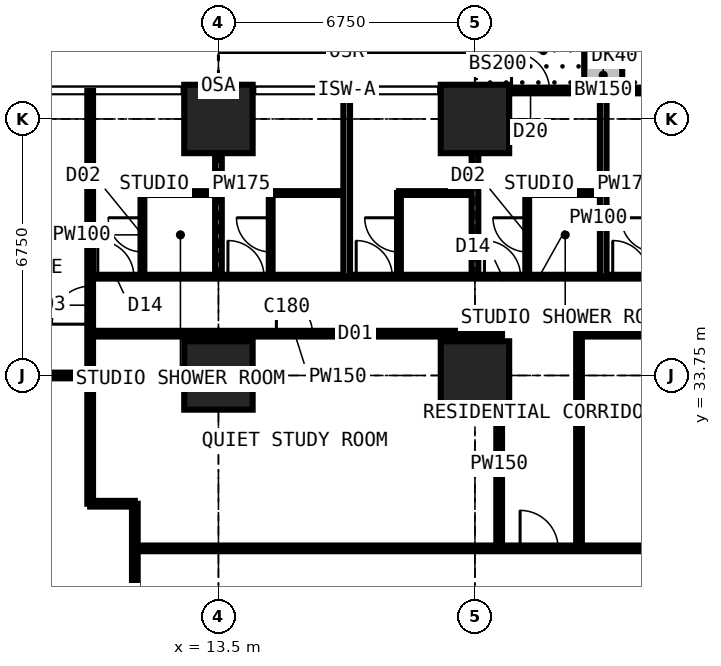
"""IFC4 building model, lengths in metres.
Left out: names, types, materials, properties, quantities, classifications, styles, units other than length and angle.
Written with IfcOpenShell. Run it as: python <this file> out.ifc"""

import sys

from ifc_helpers import new_model, si_unit, direction, frame, frame_2d, origin, origin_2d, place, context, subcontext, project, spatial, rectangle, extrude, element, fill, save


model = new_model("IFC4")
c1 = context("Model", 3, precision=1e-05, world=origin(), true_north=direction((0.0, 1.0)))
c2 = subcontext(c1, "Body", "Model", "MODEL_VIEW")
j1 = project(units=[si_unit("LENGTHUNIT", "METRE"), si_unit("PLANEANGLEUNIT", "RADIAN")], contexts=[c1])
p1 = place(None, origin())
s1 = spatial("IfcSite", under=j1, at=p1, CompositionType="ELEMENT")
p2 = place(p1, origin())
s2 = spatial("IfcBuilding", under=s1, at=p2, CompositionType="ELEMENT")
p3 = place(p2, frame((0.0, 0.0, 64.8)))
s3 = spatial("IfcBuildingStorey", under=s2, at=p3, CompositionType="ELEMENT", Elevation=64.8)
for number, where, z_axis, x_axis in (
    (1, (13.5, 33.75, 0.0), (0.0, 0.0, 1.0), (1.0, 0.0, 0.0)),
    (2, (13.5, 40.5, 0.0), (0.0, 0.0, 1.0), (1.0, 0.0, 0.0)),
    (3, (20.25, 33.75, 0.0), (0.0, 0.0, 1.0), (1.0, 0.0, 0.0)),
    (4, (20.25, 40.5, 0.0), (0.0, 0.0, 1.0), (1.0, 0.0, 0.0)),
):
    element("IfcColumn", number, at=place(p3, frame(where, z_axis=z_axis, x_axis=x_axis)), inside=s3, PredefinedType="COLUMN", context=c2, shape_type="SweptSolid", body=[
        extrude(rectangle(XDim=1.8, YDim=1.8, at=origin_2d()), origin(), (0.0, 0.0, 1.0), 3.6),
    ])
p4 = place(p3, frame((20.25, 41.25, 0.0), z_axis=(0.0, 0.0, 1.0), x_axis=(1.0, 0.0, 0.0)))
e5 = element("IfcWall", 5, at=p4, inside=s3, PredefinedType="SOLIDWALL", context=c2, shape_type="SweptSolid", body=[
    extrude(rectangle(XDim=6.75, YDim=0.15, at=frame_2d((3.375, 0.0))), origin(), (0.0, 0.0, 1.0), 3.375),
])
p5 = place(p4, frame((0.962, 0.0, 0.0)))
e6 = element("IfcOpeningElement", 6, at=p5, cuts=e5, PredefinedType="OPENING", context=c2, shape_type="SweptSolid", body=[
    extrude(rectangle(XDim=1.0, YDim=2.2, at=frame_2d((0.5, 1.1))), frame((0.0, 0.085, 0.0), z_axis=(0.0, -1.0, 0.0), x_axis=(1.0, 0.0, 0.0)), (0.0, 0.0, 1.0), 0.17),
])
p6 = place(p4, frame((2.025, 0.0, 0.9)))
e7 = element("IfcOpeningElement", 7, at=p6, cuts=e5, PredefinedType="OPENING", context=c2, shape_type="SweptSolid", body=[
    extrude(rectangle(XDim=1.2, YDim=1.8, at=frame_2d((0.6, 0.9))), frame((0.0, 0.085, 0.0), z_axis=(0.0, -1.0, 0.0), x_axis=(1.0, 0.0, 0.0)), (0.0, 0.0, 1.0), 0.17),
])
p7 = place(p4, frame((4.788, 0.0, 0.0)))
e8 = element("IfcOpeningElement", 8, at=p7, cuts=e5, PredefinedType="OPENING", context=c2, shape_type="SweptSolid", body=[
    extrude(rectangle(XDim=1.0, YDim=2.2, at=frame_2d((0.5, 1.1))), frame((0.0, 0.085, 0.0), z_axis=(0.0, -1.0, 0.0), x_axis=(1.0, 0.0, 0.0)), (0.0, 0.0, 1.0), 0.17),
])
p8 = place(p4, frame((3.525, 0.0, 0.9)))
e9 = element("IfcOpeningElement", 9, at=p8, cuts=e5, PredefinedType="OPENING", context=c2, shape_type="SweptSolid", body=[
    extrude(rectangle(XDim=1.2, YDim=1.8, at=frame_2d((0.6, 0.9))), frame((0.0, 0.085, 0.0), z_axis=(0.0, -1.0, 0.0), x_axis=(1.0, 0.0, 0.0)), (0.0, 0.0, 1.0), 0.17),
])
p9 = place(p3, frame((23.625, 41.35, 0.0), z_axis=(0.0, 0.0, 1.0), x_axis=(0.0, 1.0, 0.0)))
e10 = element("IfcWall", 10, at=p9, inside=s3, PredefinedType="USERDEFINED", context=c2, shape_type="SweptSolid", body=[
    extrude(rectangle(XDim=2.2, YDim=1.0, at=frame_2d((1.1, 0.0))), origin(), (0.0, 0.0, 1.0), 0.9),
])
p10 = place(p3, frame((4.15, 33.75, 0.0), z_axis=(0.0, 0.0, 1.0), x_axis=(1.0, 0.0, 0.0)))
e11 = element("IfcWall", 11, at=p10, inside=s3, PredefinedType="PARTITIONING", context=c2, shape_type="SweptSolid", body=[
    extrude(rectangle(XDim=5.975, YDim=0.15, at=frame_2d((2.988, 0.0))), origin(), (0.0, 0.0, 1.0), 2.877),
])
p11 = place(p3, frame((10.125, 30.375, 0.0), z_axis=(0.0, 0.0, 1.0), x_axis=(0.0, 1.0, 0.0)))
e12 = element("IfcWall", 12, at=p11, inside=s3, PredefinedType="PARTITIONING", context=c2, shape_type="SweptSolid", body=[
    extrude(rectangle(XDim=10.859, YDim=0.15, at=frame_2d((5.429, 0.0))), origin(), (0.0, 0.0, 1.0), 3.375),
])
p12 = place(p11, frame((4.725, 0.0, 0.0)))
e13 = element("IfcOpeningElement", 13, at=p12, cuts=e12, PredefinedType="OPENING", context=c2, shape_type="SweptSolid", body=[
    extrude(rectangle(XDim=1.0, YDim=2.2, at=frame_2d((0.5, 1.1))), frame((0.0, 0.085, 0.0), z_axis=(0.0, -1.0, 0.0), x_axis=(1.0, 0.0, 0.0)), (0.0, 0.0, 1.0), 0.17),
])
p13 = place(p3, frame((10.125, 30.375, 0.0), z_axis=(0.0, 0.0, 1.0), x_axis=(1.0, 0.0, 0.0)))
e14 = element("IfcWall", 14, at=p13, inside=s3, PredefinedType="PARTITIONING", context=c2, shape_type="SweptSolid", body=[
    extrude(rectangle(XDim=1.175, YDim=0.15, at=frame_2d((0.587, 0.0))), origin(), (0.0, 0.0, 1.0), 3.375),
])
p14 = place(p3, frame((10.125, 34.85, 0.0), z_axis=(0.0, 0.0, 1.0), x_axis=(1.0, 0.0, 0.0)))
e15 = element("IfcWall", 15, at=p14, inside=s3, PredefinedType="PARTITIONING", context=c2, shape_type="SweptSolid", body=[
    extrude(rectangle(XDim=10.762, YDim=0.15, at=frame_2d((5.381, 0.0))), origin(), (0.0, 0.0, 1.0), 3.375),
])
p15 = place(p14, frame((4.9, 0.0, 0.0)))
e16 = element("IfcOpeningElement", 16, at=p15, cuts=e15, PredefinedType="OPENING", context=c2, shape_type="SweptSolid", body=[
    extrude(rectangle(XDim=0.95, YDim=2.2, at=frame_2d((0.475, 1.1))), frame((0.0, 0.085, 0.0), z_axis=(0.0, -1.0, 0.0), x_axis=(1.0, 0.0, 0.0)), (0.0, 0.0, 1.0), 0.17),
])
p16 = place(p3, frame((10.125, 36.35, 0.0), z_axis=(0.0, 0.0, 1.0), x_axis=(1.0, 0.0, 0.0)))
e17 = element("IfcWall", 17, at=p16, inside=s3, PredefinedType="PARTITIONING", context=c2, shape_type="SweptSolid", body=[
    extrude(rectangle(XDim=23.625, YDim=0.1, at=frame_2d((11.812, 0.0))), origin(), (0.0, 0.0, 1.0), 3.375),
])
p17 = place(p16, frame((0.2, 0.0, 0.0)))
e18 = element("IfcOpeningElement", 18, at=p17, cuts=e17, PredefinedType="OPENING", context=c2, shape_type="SweptSolid", body=[
    extrude(rectangle(XDim=0.95, YDim=2.2, at=frame_2d((0.475, 1.1))), frame((0.0, 0.06, 0.0), z_axis=(0.0, -1.0, 0.0), x_axis=(1.0, 0.0, 0.0)), (0.0, 0.0, 1.0), 0.12),
])
p18 = place(p16, frame((3.625, 0.0, 0.0)))
e19 = element("IfcOpeningElement", 19, at=p18, cuts=e17, PredefinedType="OPENING", context=c2, shape_type="SweptSolid", body=[
    extrude(rectangle(XDim=0.95, YDim=2.2, at=frame_2d((0.475, 1.1))), frame((0.0, 0.06, 0.0), z_axis=(0.0, -1.0, 0.0), x_axis=(1.0, 0.0, 0.0)), (0.0, 0.0, 1.0), 0.12),
])
p19 = place(p16, frame((7.0, 0.0, 0.0)))
e20 = element("IfcOpeningElement", 20, at=p19, cuts=e17, PredefinedType="OPENING", context=c2, shape_type="SweptSolid", body=[
    extrude(rectangle(XDim=0.95, YDim=2.2, at=frame_2d((0.475, 1.1))), frame((0.0, 0.06, 0.0), z_axis=(0.0, -1.0, 0.0), x_axis=(1.0, 0.0, 0.0)), (0.0, 0.0, 1.0), 0.12),
])
p20 = place(p16, frame((10.375, 0.0, 0.0)))
e21 = element("IfcOpeningElement", 21, at=p20, cuts=e17, PredefinedType="OPENING", context=c2, shape_type="SweptSolid", body=[
    extrude(rectangle(XDim=0.95, YDim=2.2, at=frame_2d((0.475, 1.1))), frame((0.0, 0.06, 0.0), z_axis=(0.0, -1.0, 0.0), x_axis=(1.0, 0.0, 0.0)), (0.0, 0.0, 1.0), 0.12),
])
p21 = place(p16, frame((13.75, 0.0, 0.0)))
e22 = element("IfcOpeningElement", 22, at=p21, cuts=e17, PredefinedType="OPENING", context=c2, shape_type="SweptSolid", body=[
    extrude(rectangle(XDim=0.95, YDim=2.2, at=frame_2d((0.475, 1.1))), frame((0.0, 0.06, 0.0), z_axis=(0.0, -1.0, 0.0), x_axis=(1.0, 0.0, 0.0)), (0.0, 0.0, 1.0), 0.12),
])
p22 = place(p3, frame((11.3, 11.3, 0.0), z_axis=(0.0, 0.0, 1.0), x_axis=(0.0, 1.0, 0.0)))
e23 = element("IfcWall", 23, at=p22, inside=s3, PredefinedType="PARTITIONING", context=c2, shape_type="SweptSolid", body=[
    extrude(rectangle(XDim=19.075, YDim=0.15, at=frame_2d((9.538, 0.0))), origin(), (0.0, 0.0, 1.0), 3.375),
])
p23 = place(p22, frame((10.137, 0.0, 0.0)))
e24 = element("IfcOpeningElement", 24, at=p23, cuts=e23, PredefinedType="OPENING", context=c2, shape_type="SweptSolid", body=[
    extrude(rectangle(XDim=1.0, YDim=2.2, at=frame_2d((0.5, 1.1))), frame((0.0, 0.085, 0.0), z_axis=(0.0, -1.0, 0.0), x_axis=(1.0, 0.0, 0.0)), (0.0, 0.0, 1.0), 0.17),
])
p24 = place(p3, frame((11.3, 29.2, 0.0), z_axis=(0.0, 0.0, 1.0), x_axis=(1.0, 0.0, 0.0)))
e25 = element("IfcWall", 25, at=p24, inside=s3, PredefinedType="PARTITIONING", context=c2, shape_type="SweptSolid", body=[
    extrude(rectangle(XDim=19.075, YDim=0.15, at=frame_2d((9.538, 0.0))), origin(), (0.0, 0.0, 1.0), 3.375),
])
p25 = place(p24, frame((10.137, 0.0, 0.0)))
e26 = element("IfcOpeningElement", 26, at=p25, cuts=e25, PredefinedType="OPENING", context=c2, shape_type="SweptSolid", body=[
    extrude(rectangle(XDim=1.0, YDim=2.2, at=frame_2d((0.5, 1.1))), frame((0.0, 0.085, 0.0), z_axis=(0.0, -1.0, 0.0), x_axis=(1.0, 0.0, 0.0)), (0.0, 0.0, 1.0), 0.17),
])
p26 = place(p3, frame((11.5, 36.35, 0.0), z_axis=(0.0, 0.0, 1.0), x_axis=(0.0, 1.0, 0.0)))
e27 = element("IfcWall", 27, at=p26, inside=s3, PredefinedType="PARTITIONING", context=c2, shape_type="SweptSolid", body=[
    extrude(rectangle(XDim=2.2, YDim=0.1, at=frame_2d((1.1, 0.0))), origin(), (0.0, 0.0, 1.0), 3.375),
])
p27 = place(p26, frame((0.65, 0.0, 0.0)))
e28 = element("IfcOpeningElement", 28, at=p27, cuts=e27, PredefinedType="OPENING", context=c2, shape_type="SweptSolid", body=[
    extrude(rectangle(XDim=0.9, YDim=2.2, at=frame_2d((0.45, 1.1))), frame((0.0, 0.06, 0.0), z_axis=(0.0, -1.0, 0.0), x_axis=(1.0, 0.0, 0.0)), (0.0, 0.0, 1.0), 0.12),
])
p28 = place(p3, frame((11.5, 38.55, 0.0), z_axis=(0.0, 0.0, 1.0), x_axis=(1.0, 0.0, 0.0)))
e29 = element("IfcWall", 29, at=p28, inside=s3, PredefinedType="PARTITIONING", context=c2, shape_type="SweptSolid", body=[
    extrude(rectangle(XDim=2.0, YDim=0.1, at=frame_2d((1.0, 0.0))), origin(), (0.0, 0.0, 1.0), 3.375),
])
p29 = place(p3, frame((13.5, 36.35, 0.0), z_axis=(0.0, 0.0, 1.0), x_axis=(0.0, 1.0, 0.0)))
e30 = element("IfcWall", 30, at=p29, inside=s3, PredefinedType="PARTITIONING", context=c2, shape_type="SweptSolid", body=[
    extrude(rectangle(XDim=4.884, YDim=0.175, at=frame_2d((2.442, 0.0))), origin(), (0.0, 0.0, 1.0), 2.61),
])
p30 = place(p3, frame((14.875, 36.35, 0.0), z_axis=(0.0, 0.0, 1.0), x_axis=(0.0, 1.0, 0.0)))
e31 = element("IfcWall", 31, at=p30, inside=s3, PredefinedType="PARTITIONING", context=c2, shape_type="SweptSolid", body=[
    extrude(rectangle(XDim=2.2, YDim=0.1, at=frame_2d((1.1, 0.0))), origin(), (0.0, 0.0, 1.0), 3.375),
])
p31 = place(p30, frame((0.65, 0.0, 0.0)))
e32 = element("IfcOpeningElement", 32, at=p31, cuts=e31, PredefinedType="OPENING", context=c2, shape_type="SweptSolid", body=[
    extrude(rectangle(XDim=0.9, YDim=2.2, at=frame_2d((0.45, 1.1))), frame((0.0, 0.06, 0.0), z_axis=(0.0, -1.0, 0.0), x_axis=(1.0, 0.0, 0.0)), (0.0, 0.0, 1.0), 0.12),
])
p32 = place(p3, frame((14.875, 38.55, 0.0), z_axis=(0.0, 0.0, 1.0), x_axis=(1.0, 0.0, 0.0)))
e33 = element("IfcWall", 33, at=p32, inside=s3, PredefinedType="PARTITIONING", context=c2, shape_type="SweptSolid", body=[
    extrude(rectangle(XDim=2.0, YDim=0.1, at=frame_2d((1.0, 0.0))), origin(), (0.0, 0.0, 1.0), 3.375),
])
p33 = place(p3, frame((16.875, 36.35, 0.0), z_axis=(0.0, 0.0, 1.0), x_axis=(0.0, 1.0, 0.0)))
e34 = element("IfcWall", 34, at=p33, inside=s3, PredefinedType="PARTITIONING", context=c2, shape_type="SweptSolid", body=[
    extrude(rectangle(XDim=4.884, YDim=0.175, at=frame_2d((2.442, 0.0))), origin(), (0.0, 0.0, 1.0), 3.375),
])
p34 = place(p3, frame((18.25, 36.35, 0.0), z_axis=(0.0, 0.0, 1.0), x_axis=(0.0, 1.0, 0.0)))
e35 = element("IfcWall", 35, at=p34, inside=s3, PredefinedType="PARTITIONING", context=c2, shape_type="SweptSolid", body=[
    extrude(rectangle(XDim=2.2, YDim=0.1, at=frame_2d((1.1, 0.0))), origin(), (0.0, 0.0, 1.0), 3.375),
])
p35 = place(p34, frame((0.65, 0.0, 0.0)))
e36 = element("IfcOpeningElement", 36, at=p35, cuts=e35, PredefinedType="OPENING", context=c2, shape_type="SweptSolid", body=[
    extrude(rectangle(XDim=0.9, YDim=2.2, at=frame_2d((0.45, 1.1))), frame((0.0, 0.06, 0.0), z_axis=(0.0, -1.0, 0.0), x_axis=(1.0, 0.0, 0.0)), (0.0, 0.0, 1.0), 0.12),
])
p36 = place(p3, frame((18.25, 38.55, 0.0), z_axis=(0.0, 0.0, 1.0), x_axis=(1.0, 0.0, 0.0)))
e37 = element("IfcWall", 37, at=p36, inside=s3, PredefinedType="PARTITIONING", context=c2, shape_type="SweptSolid", body=[
    extrude(rectangle(XDim=2.0, YDim=0.1, at=frame_2d((1.0, 0.0))), origin(), (0.0, 0.0, 1.0), 3.375),
])
p37 = place(p3, frame((20.25, 36.35, 0.0), z_axis=(0.0, 0.0, 1.0), x_axis=(0.0, 1.0, 0.0)))
e38 = element("IfcWall", 38, at=p37, inside=s3, PredefinedType="PARTITIONING", context=c2, shape_type="SweptSolid", body=[
    extrude(rectangle(XDim=4.884, YDim=0.175, at=frame_2d((2.442, 0.0))), origin(), (0.0, 0.0, 1.0), 2.61),
])
p38 = place(p3, frame((20.887, 29.2, 0.0), z_axis=(0.0, 0.0, 1.0), x_axis=(0.0, 1.0, 0.0)))
e39 = element("IfcWall", 39, at=p38, inside=s3, PredefinedType="PARTITIONING", context=c2, shape_type="SweptSolid", body=[
    extrude(rectangle(XDim=5.65, YDim=0.15, at=frame_2d((2.825, 0.0))), origin(), (0.0, 0.0, 1.0), 3.375),
])
p39 = place(p3, frame((21.625, 36.35, 0.0), z_axis=(0.0, 0.0, 1.0), x_axis=(0.0, 1.0, 0.0)))
e40 = element("IfcWall", 40, at=p39, inside=s3, PredefinedType="PARTITIONING", context=c2, shape_type="SweptSolid", body=[
    extrude(rectangle(XDim=2.2, YDim=0.1, at=frame_2d((1.1, 0.0))), origin(), (0.0, 0.0, 1.0), 3.375),
])
p40 = place(p39, frame((0.65, 0.0, 0.0)))
e41 = element("IfcOpeningElement", 41, at=p40, cuts=e40, PredefinedType="OPENING", context=c2, shape_type="SweptSolid", body=[
    extrude(rectangle(XDim=0.9, YDim=2.2, at=frame_2d((0.45, 1.1))), frame((0.0, 0.06, 0.0), z_axis=(0.0, -1.0, 0.0), x_axis=(1.0, 0.0, 0.0)), (0.0, 0.0, 1.0), 0.12),
])
p41 = place(p3, frame((21.625, 38.55, 0.0), z_axis=(0.0, 0.0, 1.0), x_axis=(1.0, 0.0, 0.0)))
e42 = element("IfcWall", 42, at=p41, inside=s3, PredefinedType="PARTITIONING", context=c2, shape_type="SweptSolid", body=[
    extrude(rectangle(XDim=2.0, YDim=0.1, at=frame_2d((1.0, 0.0))), origin(), (0.0, 0.0, 1.0), 3.375),
])
p42 = place(p3, frame((22.988, 34.85, 0.0), z_axis=(0.0, 0.0, 1.0), x_axis=(1.0, 0.0, 0.0)))
e43 = element("IfcWall", 43, at=p42, inside=s3, PredefinedType="PARTITIONING", context=c2, shape_type="SweptSolid", body=[
    extrude(rectangle(XDim=10.762, YDim=0.15, at=frame_2d((5.381, 0.0))), origin(), (0.0, 0.0, 1.0), 3.375),
])
p43 = place(p42, frame((4.95, 0.0, 0.0)))
e44 = element("IfcOpeningElement", 44, at=p43, cuts=e43, PredefinedType="OPENING", context=c2, shape_type="SweptSolid", body=[
    extrude(rectangle(XDim=0.95, YDim=2.2, at=frame_2d((0.475, 1.1))), frame((0.0, 0.085, 0.0), z_axis=(0.0, -1.0, 0.0), x_axis=(1.0, 0.0, 0.0)), (0.0, 0.0, 1.0), 0.17),
])
p44 = place(p3, frame((22.988, 29.2, 0.0), z_axis=(0.0, 0.0, 1.0), x_axis=(0.0, 1.0, 0.0)))
e45 = element("IfcWall", 45, at=p44, inside=s3, PredefinedType="PARTITIONING", context=c2, shape_type="SweptSolid", body=[
    extrude(rectangle(XDim=5.65, YDim=0.15, at=frame_2d((2.825, 0.0))), origin(), (0.0, 0.0, 1.0), 3.375),
])
p45 = place(p3, frame((23.625, 36.35, 0.0), z_axis=(0.0, 0.0, 1.0), x_axis=(0.0, 1.0, 0.0)))
e46 = element("IfcWall", 46, at=p45, inside=s3, PredefinedType="PARTITIONING", context=c2, shape_type="SweptSolid", body=[
    extrude(rectangle(XDim=4.884, YDim=0.175, at=frame_2d((2.442, 0.0))), origin(), (0.0, 0.0, 1.0), 3.375),
])
p46 = place(p5, origin())
e47 = element("IfcDoor", 47, at=p46, inside=s3, OperationType="SINGLE_SWING_LEFT", PredefinedType="DOOR", context=c2, shape_type="SweptSolid", body=[
    extrude(rectangle(XDim=1.0, YDim=2.2, at=frame_2d((0.5, 1.1))), frame((0.0, 0.025, 0.0), z_axis=(0.0, -1.0, 0.0), x_axis=(1.0, 0.0, 0.0)), (0.0, 0.0, 1.0), 0.05),
])
fill(e6, e47)
p47 = place(p6, origin())
e48 = element("IfcWindow", 48, at=p47, inside=s3, PartitioningType="SINGLE_PANEL", PredefinedType="WINDOW", context=c2, shape_type="SweptSolid", body=[
    extrude(rectangle(XDim=1.2, YDim=1.8, at=frame_2d((0.6, 0.9))), frame((0.0, 0.03, 0.0), z_axis=(0.0, -1.0, 0.0), x_axis=(1.0, 0.0, 0.0)), (0.0, 0.0, 1.0), 0.06),
])
fill(e7, e48)
p48 = place(p8, origin())
e49 = element("IfcWindow", 49, at=p48, inside=s3, PartitioningType="SINGLE_PANEL", PredefinedType="WINDOW", context=c2, shape_type="SweptSolid", body=[
    extrude(rectangle(XDim=1.2, YDim=1.8, at=frame_2d((0.6, 0.9))), frame((0.0, 0.03, 0.0), z_axis=(0.0, -1.0, 0.0), x_axis=(1.0, 0.0, 0.0)), (0.0, 0.0, 1.0), 0.06),
])
fill(e9, e49)
p49 = place(p17, origin())
e50 = element("IfcDoor", 50, at=p49, inside=s3, OperationType="SINGLE_SWING_LEFT", PredefinedType="DOOR", context=c2, shape_type="SweptSolid", body=[
    extrude(rectangle(XDim=0.95, YDim=2.2, at=frame_2d((0.475, 1.1))), frame((0.0, 0.025, 0.0), z_axis=(0.0, -1.0, 0.0), x_axis=(1.0, 0.0, 0.0)), (0.0, 0.0, 1.0), 0.05),
])
fill(e18, e50)
p50 = place(p27, origin())
e51 = element("IfcDoor", 51, at=p50, inside=s3, OperationType="SINGLE_SWING_RIGHT", PredefinedType="DOOR", context=c2, shape_type="SweptSolid", body=[
    extrude(rectangle(XDim=0.9, YDim=2.2, at=frame_2d((0.45, 1.1))), frame((0.0, 0.025, 0.0), z_axis=(0.0, -1.0, 0.0), x_axis=(1.0, 0.0, 0.0)), (0.0, 0.0, 1.0), 0.05),
])
fill(e28, e51)
p51 = place(p18, origin())
e52 = element("IfcDoor", 52, at=p51, inside=s3, OperationType="SINGLE_SWING_LEFT", PredefinedType="DOOR", context=c2, shape_type="SweptSolid", body=[
    extrude(rectangle(XDim=0.95, YDim=2.2, at=frame_2d((0.475, 1.1))), frame((0.0, 0.025, 0.0), z_axis=(0.0, -1.0, 0.0), x_axis=(1.0, 0.0, 0.0)), (0.0, 0.0, 1.0), 0.05),
])
fill(e19, e52)
p52 = place(p31, origin())
e53 = element("IfcDoor", 53, at=p52, inside=s3, OperationType="SINGLE_SWING_RIGHT", PredefinedType="DOOR", context=c2, shape_type="SweptSolid", body=[
    extrude(rectangle(XDim=0.9, YDim=2.2, at=frame_2d((0.45, 1.1))), frame((0.0, 0.025, 0.0), z_axis=(0.0, -1.0, 0.0), x_axis=(1.0, 0.0, 0.0)), (0.0, 0.0, 1.0), 0.05),
])
fill(e32, e53)
p53 = place(p19, origin())
e54 = element("IfcDoor", 54, at=p53, inside=s3, OperationType="SINGLE_SWING_LEFT", PredefinedType="DOOR", context=c2, shape_type="SweptSolid", body=[
    extrude(rectangle(XDim=0.95, YDim=2.2, at=frame_2d((0.475, 1.1))), frame((0.0, 0.025, 0.0), z_axis=(0.0, -1.0, 0.0), x_axis=(1.0, 0.0, 0.0)), (0.0, 0.0, 1.0), 0.05),
])
fill(e20, e54)
p54 = place(p35, origin())
e55 = element("IfcDoor", 55, at=p54, inside=s3, OperationType="SINGLE_SWING_RIGHT", PredefinedType="DOOR", context=c2, shape_type="SweptSolid", body=[
    extrude(rectangle(XDim=0.9, YDim=2.2, at=frame_2d((0.45, 1.1))), frame((0.0, 0.025, 0.0), z_axis=(0.0, -1.0, 0.0), x_axis=(1.0, 0.0, 0.0)), (0.0, 0.0, 1.0), 0.05),
])
fill(e36, e55)
p55 = place(p20, origin())
e56 = element("IfcDoor", 56, at=p55, inside=s3, OperationType="SINGLE_SWING_LEFT", PredefinedType="DOOR", context=c2, shape_type="SweptSolid", body=[
    extrude(rectangle(XDim=0.95, YDim=2.2, at=frame_2d((0.475, 1.1))), frame((0.0, 0.025, 0.0), z_axis=(0.0, -1.0, 0.0), x_axis=(1.0, 0.0, 0.0)), (0.0, 0.0, 1.0), 0.05),
])
fill(e21, e56)
p56 = place(p40, origin())
e57 = element("IfcDoor", 57, at=p56, inside=s3, OperationType="SINGLE_SWING_RIGHT", PredefinedType="DOOR", context=c2, shape_type="SweptSolid", body=[
    extrude(rectangle(XDim=0.9, YDim=2.2, at=frame_2d((0.45, 1.1))), frame((0.0, 0.025, 0.0), z_axis=(0.0, -1.0, 0.0), x_axis=(1.0, 0.0, 0.0)), (0.0, 0.0, 1.0), 0.05),
])
fill(e41, e57)
p57 = place(p21, origin())
e58 = element("IfcDoor", 58, at=p57, inside=s3, OperationType="SINGLE_SWING_LEFT", PredefinedType="DOOR", context=c2, shape_type="SweptSolid", body=[
    extrude(rectangle(XDim=0.95, YDim=2.2, at=frame_2d((0.475, 1.1))), frame((0.0, 0.025, 0.0), z_axis=(0.0, -1.0, 0.0), x_axis=(1.0, 0.0, 0.0)), (0.0, 0.0, 1.0), 0.05),
])
fill(e22, e58)
p58 = place(p25, origin())
e59 = element("IfcDoor", 59, at=p58, inside=s3, OperationType="SINGLE_SWING_LEFT", PredefinedType="DOOR", context=c2, shape_type="SweptSolid", body=[
    extrude(rectangle(XDim=1.0, YDim=2.2, at=frame_2d((0.5, 1.1))), frame((0.0, 0.025, 0.0), z_axis=(0.0, -1.0, 0.0), x_axis=(1.0, 0.0, 0.0)), (0.0, 0.0, 1.0), 0.05),
])
fill(e26, e59)
p59 = place(p15, origin())
e60 = element("IfcDoor", 60, at=p59, inside=s3, OperationType="SINGLE_SWING_LEFT", PredefinedType="DOOR", context=c2, shape_type="SweptSolid", body=[
    extrude(rectangle(XDim=0.95, YDim=2.2, at=frame_2d((0.475, 1.1))), frame((0.0, 0.025, 0.0), z_axis=(0.0, -1.0, 0.0), x_axis=(1.0, 0.0, 0.0)), (0.0, 0.0, 1.0), 0.05),
])
fill(e16, e60)
p60 = place(p12, origin())
e61 = element("IfcDoor", 61, at=p60, inside=s3, OperationType="SINGLE_SWING_LEFT", PredefinedType="DOOR", context=c2, shape_type="SweptSolid", body=[
    extrude(rectangle(XDim=1.0, YDim=2.2, at=frame_2d((0.5, 1.1))), frame((0.0, 0.025, 0.0), z_axis=(0.0, -1.0, 0.0), x_axis=(1.0, 0.0, 0.0)), (0.0, 0.0, 1.0), 0.05),
])
fill(e13, e61)
save(model, sys.argv[1])
